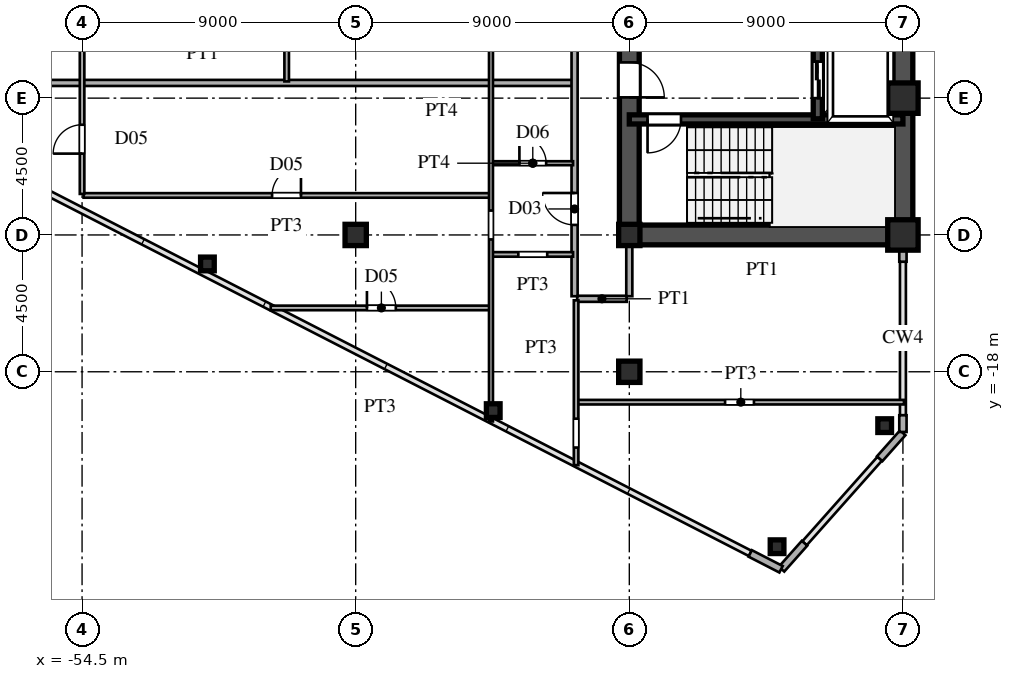
"""IFC4 building model, lengths in metres.
Left out: names, types, materials, properties, quantities, classifications, styles, units other than length and angle.
Written with IfcOpenShell. Run it as: python <this file> out.ifc"""

import sys

from ifc_helpers import new_model, si_unit, direction, frame, frame_2d, origin, origin_2d, place, context, subcontext, project, spatial, rectangle, hollow_rectangle, i_section, extrude, source, transform, mapped, element, fill, save


model = new_model("IFC4")
c1 = context("Model", 3, precision=1e-05, world=origin(), true_north=direction((0.0, 1.0)))
c2 = subcontext(c1, "Body", "Model", "MODEL_VIEW")
j1 = project(units=[si_unit("LENGTHUNIT", "METRE"), si_unit("PLANEANGLEUNIT", "RADIAN")], contexts=[c1])
p1 = place(None, origin())
s1 = spatial("IfcSite", under=j1, at=p1, CompositionType="ELEMENT")
p2 = place(p1, origin())
s2 = spatial("IfcBuilding", under=s1, at=p2, CompositionType="ELEMENT")
p3 = place(p2, frame((0.0, 0.0, 114.0)))
s3 = spatial("IfcBuildingStorey", under=s2, at=p3, CompositionType="ELEMENT", Elevation=114.0)
m1 = source(origin(), c2, "Body", "SweptSolid", [
    extrude(hollow_rectangle(XDim=1.0, YDim=1.0, WallThickness=0.042, at=origin_2d()), origin(), (0.0, 0.0, 1.0), 3.6),
])
for number, where, z_axis, x_axis in (
    (1, (-27.5, -13.5, 0.0), (0.0, 0.0, 1.0), (1.0, 0.0, 0.0)),
    (2, (-27.5, -9.0, 0.0), (0.0, 0.0, 1.0), (1.0, 0.0, 0.0)),
):
    element("IfcColumn", number, at=place(p3, frame(where, z_axis=z_axis, x_axis=x_axis)), inside=s3, PredefinedType="COLUMN", context=c2, shape_type="MappedRepresentation", body=[
        mapped(m1, transform((0.0, 0.0, 0.0), scale=1.0)),
    ])
m2 = source(origin(), c2, "Body", "SweptSolid", [
    extrude(i_section(OverallWidth=0.7, OverallDepth=0.7, WebThickness=0.028, FlangeThickness=0.045, at=origin_2d()), origin(), (0.0, 0.0, 1.0), 3.6),
])
for number, where, z_axis, x_axis in (
    (3, (-36.5, -18.0, 0.0), (0.0, 0.0, 1.0), (1.0, 0.0, 0.0)),
    (4, (-36.5, -13.5, 0.0), (0.0, 0.0, 1.0), (1.0, 0.0, 0.0)),
    (5, (-45.5, -13.5, 0.0), (0.0, 0.0, 1.0), (1.0, 0.0, 0.0)),
):
    element("IfcColumn", number, at=place(p3, frame(where, z_axis=z_axis, x_axis=x_axis)), inside=s3, PredefinedType="COLUMN", context=c2, shape_type="MappedRepresentation", body=[
        mapped(m2, transform((0.0, 0.0, 0.0), scale=1.0)),
    ])
m3 = source(origin(), c2, "Body", "SweptSolid", [
    extrude(hollow_rectangle(XDim=0.45, YDim=0.45, WallThickness=0.018, at=origin_2d()), origin(), (0.0, 0.0, 1.0), 3.6),
])
for number, where, z_axis, x_axis in (
    (6, (-28.1, -19.772, 0.0), (0.0, 0.0, 1.0), (1.0, 0.0, 0.0)),
    (7, (-31.64, -23.754, 0.0), (0.0, 0.0, 1.0), (1.0, 0.0, 0.0)),
    (8, (-40.976, -19.278, 0.0), (0.0, 0.0, 1.0), (1.0, 0.0, 0.0)),
    (9, (-50.377, -14.453, 0.0), (0.0, 0.0, 1.0), (1.0, 0.0, 0.0)),
):
    element("IfcColumn", number, at=place(p3, frame(where, z_axis=z_axis, x_axis=x_axis)), inside=s3, PredefinedType="COLUMN", context=c2, shape_type="MappedRepresentation", body=[
        mapped(m3, transform((0.0, 0.0, 0.0), scale=1.0)),
    ])
p4 = place(p3, frame((-27.5, -19.98, 0.0), z_axis=(0.0, 0.0, 1.0), x_axis=(0.0, 1.0, 0.0)))
e10 = element("IfcWall", 10, at=p4, inside=s3, PredefinedType="SOLIDWALL", context=c2, shape_type="SweptSolid", body=[
    extrude(rectangle(XDim=0.55, YDim=0.24, at=frame_2d((0.275, 0.0))), origin(), (0.0, 0.0, 1.0), 3.38),
])
p5 = place(p3, frame((-27.5, -14.38, 0.0), z_axis=(0.0, 0.0, 1.0), x_axis=(0.0, 1.0, 0.0)))
e11 = element("IfcWall", 11, at=p5, inside=s3, PredefinedType="SOLIDWALL", context=c2, shape_type="SweptSolid", body=[
    extrude(rectangle(XDim=0.55, YDim=0.24, at=frame_2d((0.275, 0.0))), origin(), (0.0, 0.0, 1.0), 2.88),
])
p6 = place(p3, frame((-32.523, -23.975, 0.0), z_axis=(0.0, 0.0, 1.0), x_axis=(0.889797395748, -0.456355776255, 0.0)))
e12 = element("IfcWall", 12, at=p6, inside=s3, PredefinedType="SOLIDWALL", context=c2, shape_type="SweptSolid", body=[
    extrude(rectangle(XDim=1.14, YDim=0.24, at=frame_2d((0.57, 0.0))), origin(), (0.0, 0.0, 1.0), 3.38),
])
for number, where, z_axis, x_axis in (
    (13, (-31.493, -24.492, 0.0), (0.0, 0.0, 1.0), (0.664, 0.747, 0.0)),
    (14, (-28.264, -20.86, 0.0), (0.0, 0.0, 1.0), (0.664, 0.747, 0.0)),
):
    element("IfcWall", number, at=place(p3, frame(where, z_axis=z_axis, x_axis=x_axis)), inside=s3, PredefinedType="SOLIDWALL", context=c2, shape_type="SweptSolid", body=[
        extrude(rectangle(XDim=1.14, YDim=0.24, at=frame_2d((0.57, 0.0))), origin(), (0.0, 0.0, 1.0), 3.38),
    ])
p7 = place(p3, frame((-27.5, -13.5, 0.0), z_axis=(0.0, 0.0, 1.0), x_axis=(0.0, 1.0, 0.0)))
e15 = element("IfcWall", 15, at=p7, inside=s3, PredefinedType="SHEAR", context=c2, shape_type="SweptSolid", body=[
    extrude(rectangle(XDim=12.2, YDim=0.65, at=frame_2d((6.1, 0.0))), origin(), (0.0, 0.0, 1.0), 3.38),
])
p8 = place(p3, frame((-36.5, -13.5, 0.0), z_axis=(0.0, 0.0, 1.0), x_axis=(1.0, 0.0, 0.0)))
e16 = element("IfcWall", 16, at=p8, inside=s3, PredefinedType="SHEAR", context=c2, shape_type="SweptSolid", body=[
    extrude(rectangle(XDim=9.0, YDim=0.65, at=frame_2d((4.5, 0.0))), origin(), (0.0, 0.0, 1.0), 3.38),
])
p9 = place(p3, frame((-36.5, -13.65, 0.0), z_axis=(0.0, 0.0, 1.0), x_axis=(0.0, 1.0, 0.0)))
e17 = element("IfcWall", 17, at=p9, inside=s3, PredefinedType="SHEAR", context=c2, shape_type="SweptSolid", body=[
    extrude(rectangle(XDim=7.15, YDim=0.65, at=frame_2d((3.575, 0.0))), origin(), (0.0, 0.0, 1.0), 3.38),
])
p10 = place(p9, frame((4.675, 0.0, 0.0)))
e18 = element("IfcOpeningElement", 18, at=p10, cuts=e17, PredefinedType="OPENING", context=c2, shape_type="SweptSolid", body=[
    extrude(rectangle(XDim=1.15, YDim=2.2, at=frame_2d((0.575, 1.1))), frame((0.0, 0.335, 0.0), z_axis=(0.0, -1.0, 0.0), x_axis=(1.0, 0.0, 0.0)), (0.0, 0.0, 1.0), 0.67),
])
p11 = place(p3, frame((-36.5, -9.7, 0.0), z_axis=(0.0, 0.0, 1.0), x_axis=(1.0, 0.0, 0.0)))
e19 = element("IfcWall", 19, at=p11, inside=s3, PredefinedType="SHEAR", context=c2, shape_type="SweptSolid", body=[
    extrude(rectangle(XDim=9.0, YDim=0.3, at=frame_2d((4.5, 0.0))), origin(), (0.0, 0.0, 1.0), 3.38),
])
p12 = place(p11, frame((0.6, 0.0, 0.0)))
e20 = element("IfcOpeningElement", 20, at=p12, cuts=e19, PredefinedType="OPENING", context=c2, shape_type="SweptSolid", body=[
    extrude(rectangle(XDim=1.1, YDim=2.2, at=frame_2d((0.55, 1.1))), frame((0.0, 0.16, 0.0), z_axis=(0.0, -1.0, 0.0), x_axis=(1.0, 0.0, 0.0)), (0.0, 0.0, 1.0), 0.32),
])
p13 = place(p3, frame((-30.3, -9.68, 0.0), z_axis=(0.0, 0.0, 1.0), x_axis=(0.0, 1.0, 0.0)))
e21 = element("IfcWall", 21, at=p13, inside=s3, PredefinedType="SHEAR", context=c2, shape_type="SweptSolid", body=[
    extrude(rectangle(XDim=2.56, YDim=0.3, at=frame_2d((1.28, 0.0))), origin(), (0.0, 0.0, 1.0), 3.38),
])
p14 = place(p13, frame((0.68, 0.0, 0.0)))
e22 = element("IfcOpeningElement", 22, at=p14, cuts=e21, PredefinedType="OPENING", context=c2, shape_type="SweptSolid", body=[
    extrude(rectangle(XDim=1.2, YDim=2.25, at=frame_2d((0.6, 1.125))), frame((0.0, 0.16, 0.0), z_axis=(0.0, -1.0, 0.0), x_axis=(1.0, 0.0, 0.0)), (0.0, 0.0, 1.0), 0.32),
])
p15 = place(p3, frame((-38.2, -19.0, 0.0), z_axis=(0.0, 0.0, 1.0), x_axis=(1.0, 0.0, 0.0)))
e23 = element("IfcWall", 23, at=p15, inside=s3, PredefinedType="PARTITIONING", context=c2, shape_type="SweptSolid", body=[
    extrude(rectangle(XDim=10.735, YDim=0.15, at=frame_2d((5.367, 0.0))), origin(), (0.0, 0.0, 1.0), 3.38),
])
p16 = place(p15, frame((4.85, 0.0, 0.0)))
e24 = element("IfcOpeningElement", 24, at=p16, cuts=e23, PredefinedType="OPENING", context=c2, shape_type="SweptSolid", body=[
    extrude(rectangle(XDim=0.95, YDim=2.15, at=frame_2d((0.475, 1.075))), frame((0.0, 0.085, 0.0), z_axis=(0.0, -1.0, 0.0), x_axis=(1.0, 0.0, 0.0)), (0.0, 0.0, 1.0), 0.17),
])
p17 = place(p3, frame((-48.295, -15.9, 0.0), z_axis=(0.0, 0.0, 1.0), x_axis=(1.0, 0.0, 0.0)))
e25 = element("IfcWall", 25, at=p17, inside=s3, PredefinedType="PARTITIONING", context=c2, shape_type="SweptSolid", body=[
    extrude(rectangle(XDim=7.195, YDim=0.15, at=frame_2d((3.597, 0.0))), origin(), (0.0, 0.0, 1.0), 3.38),
])
p18 = place(p17, frame((3.165, 0.0, 0.0)))
e26 = element("IfcOpeningElement", 26, at=p18, cuts=e25, PredefinedType="OPENING", context=c2, shape_type="SweptSolid", body=[
    extrude(rectangle(XDim=0.95, YDim=2.15, at=frame_2d((0.475, 1.075))), frame((0.0, 0.085, 0.0), z_axis=(0.0, -1.0, 0.0), x_axis=(1.0, 0.0, 0.0)), (0.0, 0.0, 1.0), 0.17),
])
p19 = place(p3, frame((-38.215, -15.6, 0.0), z_axis=(0.0, 0.0, 1.0), x_axis=(1.0, 0.0, 0.0)))
e27 = element("IfcWall", 27, at=p19, inside=s3, PredefinedType="PARTITIONING", context=c2, shape_type="SweptSolid", body=[
    extrude(rectangle(XDim=1.63, YDim=0.2, at=frame_2d((0.815, 0.0))), origin(), (0.0, 0.0, 1.0), 3.38),
])
p20 = place(p3, frame((-41.0, -14.14, 0.0), z_axis=(0.0, 0.0, 1.0), x_axis=(1.0, 0.0, 0.0)))
e28 = element("IfcWall", 28, at=p20, inside=s3, PredefinedType="PARTITIONING", context=c2, shape_type="SweptSolid", body=[
    extrude(rectangle(XDim=2.65, YDim=0.15, at=frame_2d((1.325, 0.0))), origin(), (0.0, 0.0, 1.0), 3.38),
])
p21 = place(p20, frame((0.85, 0.0, 0.0)))
e29 = element("IfcOpeningElement", 29, at=p21, cuts=e28, PredefinedType="OPENING", context=c2, shape_type="SweptSolid", body=[
    extrude(rectangle(XDim=0.95, YDim=2.15, at=frame_2d((0.475, 1.075))), frame((0.0, 0.085, 0.0), z_axis=(0.0, -1.0, 0.0), x_axis=(1.0, 0.0, 0.0)), (0.0, 0.0, 1.0), 0.17),
])
p22 = place(p3, frame((-54.45, -12.2, 0.0), z_axis=(0.0, 0.0, 1.0), x_axis=(1.0, 0.0, 0.0)))
e30 = element("IfcWall", 30, at=p22, inside=s3, PredefinedType="PARTITIONING", context=c2, shape_type="SweptSolid", body=[
    extrude(rectangle(XDim=13.35, YDim=0.15, at=frame_2d((6.675, 0.0))), origin(), (0.0, 0.0, 1.0), 3.38),
])
p23 = place(p22, frame((6.2, 0.0, 0.0)))
e31 = element("IfcOpeningElement", 31, at=p23, cuts=e30, PredefinedType="OPENING", context=c2, shape_type="SweptSolid", body=[
    extrude(rectangle(XDim=0.95, YDim=2.15, at=frame_2d((0.475, 1.075))), frame((0.0, 0.085, 0.0), z_axis=(0.0, -1.0, 0.0), x_axis=(1.0, 0.0, 0.0)), (0.0, 0.0, 1.0), 0.17),
])
p24 = place(p3, frame((-41.0, -11.14, 0.0), z_axis=(0.0, 0.0, 1.0), x_axis=(1.0, 0.0, 0.0)))
e32 = element("IfcWall", 32, at=p24, inside=s3, PredefinedType="PARTITIONING", context=c2, shape_type="SweptSolid", body=[
    extrude(rectangle(XDim=2.65, YDim=0.13, at=frame_2d((1.325, 0.0))), origin(), (0.0, 0.0, 1.0), 3.38),
])
p25 = place(p24, frame((0.885, 0.0, 0.0)))
e33 = element("IfcOpeningElement", 33, at=p25, cuts=e32, PredefinedType="OPENING", context=c2, shape_type="SweptSolid", body=[
    extrude(rectangle(XDim=0.88, YDim=2.1, at=frame_2d((0.44, 1.05))), frame((0.0, 0.075, 0.0), z_axis=(0.0, -1.0, 0.0), x_axis=(1.0, 0.0, 0.0)), (0.0, 0.0, 1.0), 0.15),
])
p26 = place(p3, frame((-62.69, -8.5, 0.0), z_axis=(0.0, 0.0, 1.0), x_axis=(1.0, 0.0, 0.0)))
e34 = element("IfcWall", 34, at=p26, inside=s3, PredefinedType="PARTITIONING", context=c2, shape_type="SweptSolid", body=[
    extrude(rectangle(XDim=24.31, YDim=0.2, at=frame_2d((12.155, 0.0))), origin(), (0.0, 0.0, 1.0), 3.38),
])
p27 = place(p3, frame((-54.5, -12.15, 0.0), z_axis=(0.0, 0.0, 1.0), x_axis=(0.0, 1.0, 0.0)))
e35 = element("IfcWall", 35, at=p27, inside=s3, PredefinedType="PARTITIONING", context=c2, shape_type="SweptSolid", body=[
    extrude(rectangle(XDim=22.3, YDim=0.15, at=frame_2d((11.15, 0.0))), origin(), (0.0, 0.0, 1.0), 2.78),
])
p28 = place(p27, frame((1.325, 0.0, 0.0)))
e36 = element("IfcOpeningElement", 36, at=p28, cuts=e35, PredefinedType="OPENING", context=c2, shape_type="SweptSolid", body=[
    extrude(rectangle(XDim=0.95, YDim=2.15, at=frame_2d((0.475, 1.075))), frame((0.0, 0.085, 0.0), z_axis=(0.0, -1.0, 0.0), x_axis=(1.0, 0.0, 0.0)), (0.0, 0.0, 1.0), 0.17),
])
p29 = place(p27, frame((10.175, 0.0, 0.0)))
e37 = element("IfcOpeningElement", 37, at=p29, cuts=e35, PredefinedType="OPENING", context=c2, shape_type="SweptSolid", body=[
    extrude(rectangle(XDim=0.95, YDim=2.15, at=frame_2d((0.475, 1.075))), frame((0.0, 0.085, 0.0), z_axis=(0.0, -1.0, 0.0), x_axis=(1.0, 0.0, 0.0)), (0.0, 0.0, 1.0), 0.17),
])
p30 = place(p27, frame((5.508, 0.0, 0.0)))
e38 = element("IfcOpeningElement", 38, at=p30, cuts=e35, PredefinedType="OPENING", context=c2, shape_type="SweptSolid", body=[
    extrude(rectangle(XDim=0.95, YDim=2.15, at=frame_2d((0.475, 1.075))), frame((0.0, 0.085, 0.0), z_axis=(0.0, -1.0, 0.0), x_axis=(1.0, 0.0, 0.0)), (0.0, 0.0, 1.0), 0.17),
])
p31 = place(p27, frame((14.842, 0.0, 0.0)))
e39 = element("IfcOpeningElement", 39, at=p31, cuts=e35, PredefinedType="OPENING", context=c2, shape_type="SweptSolid", body=[
    extrude(rectangle(XDim=0.95, YDim=2.15, at=frame_2d((0.475, 1.075))), frame((0.0, 0.085, 0.0), z_axis=(0.0, -1.0, 0.0), x_axis=(1.0, 0.0, 0.0)), (0.0, 0.0, 1.0), 0.17),
])
p32 = place(p27, frame((19.525, 0.0, 0.0)))
e40 = element("IfcOpeningElement", 40, at=p32, cuts=e35, PredefinedType="OPENING", context=c2, shape_type="SweptSolid", body=[
    extrude(rectangle(XDim=0.95, YDim=2.15, at=frame_2d((0.475, 1.075))), frame((0.0, 0.085, 0.0), z_axis=(0.0, -1.0, 0.0), x_axis=(1.0, 0.0, 0.0)), (0.0, 0.0, 1.0), 0.17),
])
p33 = place(p3, frame((-47.77, -8.45, 0.0), z_axis=(0.0, 0.0, 1.0), x_axis=(0.0, 1.0, 0.0)))
e41 = element("IfcWall", 41, at=p33, inside=s3, PredefinedType="PARTITIONING", context=c2, shape_type="SweptSolid", body=[
    extrude(rectangle(XDim=23.3, YDim=0.15, at=frame_2d((11.65, 0.0))), origin(), (0.0, 0.0, 1.0), 3.38),
])
p34 = place(p33, frame((6.475, 0.0, 0.0)))
e42 = element("IfcOpeningElement", 42, at=p34, cuts=e41, PredefinedType="OPENING", context=c2, shape_type="SweptSolid", body=[
    extrude(rectangle(XDim=0.95, YDim=2.15, at=frame_2d((0.475, 1.075))), frame((0.0, 0.085, 0.0), z_axis=(0.0, -1.0, 0.0), x_axis=(1.0, 0.0, 0.0)), (0.0, 0.0, 1.0), 0.17),
])
p35 = place(p33, frame((20.525, 0.0, 0.0)))
e43 = element("IfcOpeningElement", 43, at=p35, cuts=e41, PredefinedType="OPENING", context=c2, shape_type="SweptSolid", body=[
    extrude(rectangle(XDim=0.95, YDim=2.15, at=frame_2d((0.475, 1.075))), frame((0.0, 0.085, 0.0), z_axis=(0.0, -1.0, 0.0), x_axis=(1.0, 0.0, 0.0)), (0.0, 0.0, 1.0), 0.17),
])
p36 = place(p33, frame((15.825, 0.0, 0.0)))
e44 = element("IfcOpeningElement", 44, at=p36, cuts=e41, PredefinedType="OPENING", context=c2, shape_type="SweptSolid", body=[
    extrude(rectangle(XDim=0.95, YDim=2.15, at=frame_2d((0.475, 1.075))), frame((0.0, 0.085, 0.0), z_axis=(0.0, -1.0, 0.0), x_axis=(1.0, 0.0, 0.0)), (0.0, 0.0, 1.0), 0.17),
])
p37 = place(p3, frame((-41.05, -19.634, 0.0), z_axis=(0.0, 0.0, 1.0), x_axis=(0.0, 1.0, 0.0)))
e45 = element("IfcWall", 45, at=p37, inside=s3, PredefinedType="PARTITIONING", context=c2, shape_type="SweptSolid", body=[
    extrude(rectangle(XDim=20.417, YDim=0.13, at=frame_2d((10.208, 0.0))), origin(), (0.0, 0.0, 1.0), 2.99),
])
p38 = place(p37, frame((5.987, 0.0, 0.0)))
e46 = element("IfcOpeningElement", 46, at=p38, cuts=e45, PredefinedType="OPENING", context=c2, shape_type="SweptSolid", body=[
    extrude(rectangle(XDim=0.95, YDim=2.15, at=frame_2d((0.475, 1.075))), frame((0.0, 0.075, 0.0), z_axis=(0.0, -1.0, 0.0), x_axis=(1.0, 0.0, 0.0)), (0.0, 0.0, 1.0), 0.15),
])
p39 = place(p37, frame((17.659, 0.0, 0.0)))
e47 = element("IfcOpeningElement", 47, at=p39, cuts=e45, PredefinedType="OPENING", context=c2, shape_type="SweptSolid", body=[
    extrude(rectangle(XDim=0.95, YDim=2.15, at=frame_2d((0.475, 1.075))), frame((0.0, 0.075, 0.0), z_axis=(0.0, -1.0, 0.0), x_axis=(1.0, 0.0, 0.0)), (0.0, 0.0, 1.0), 0.15),
])
p40 = place(p3, frame((-38.3, -15.515, 0.0), z_axis=(0.0, 0.0, 1.0), x_axis=(0.0, 1.0, 0.0)))
e48 = element("IfcWall", 48, at=p40, inside=s3, PredefinedType="PARTITIONING", context=c2, shape_type="SweptSolid", body=[
    extrude(rectangle(XDim=31.03, YDim=0.2, at=frame_2d((15.515, 0.0))), origin(), (0.0, 0.0, 1.0), 3.38),
])
p41 = place(p40, frame((2.345, 0.0, 0.0)))
e49 = element("IfcOpeningElement", 49, at=p41, cuts=e48, PredefinedType="OPENING", context=c2, shape_type="SweptSolid", body=[
    extrude(rectangle(XDim=1.05, YDim=2.25, at=frame_2d((0.525, 1.125))), frame((0.0, 0.11, 0.0), z_axis=(0.0, -1.0, 0.0), x_axis=(1.0, 0.0, 0.0)), (0.0, 0.0, 1.0), 0.22),
])
p42 = place(p40, frame((13.28, 0.0, 0.0)))
e50 = element("IfcOpeningElement", 50, at=p42, cuts=e48, PredefinedType="OPENING", context=c2, shape_type="SweptSolid", body=[
    extrude(rectangle(XDim=1.05, YDim=2.25, at=frame_2d((0.525, 1.125))), frame((0.0, 0.11, 0.0), z_axis=(0.0, -1.0, 0.0), x_axis=(1.0, 0.0, 0.0)), (0.0, 0.0, 1.0), 0.22),
])
p43 = place(p40, frame((25.567, 0.0, 0.0)))
e51 = element("IfcOpeningElement", 51, at=p43, cuts=e48, PredefinedType="OPENING", context=c2, shape_type="SweptSolid", body=[
    extrude(rectangle(XDim=1.05, YDim=2.25, at=frame_2d((0.525, 1.125))), frame((0.0, 0.11, 0.0), z_axis=(0.0, -1.0, 0.0), x_axis=(1.0, 0.0, 0.0)), (0.0, 0.0, 1.0), 0.22),
])
p44 = place(p3, frame((-38.25, -21.071, 0.0), z_axis=(0.0, 0.0, 1.0), x_axis=(0.0, 1.0, 0.0)))
e52 = element("IfcWall", 52, at=p44, inside=s3, PredefinedType="PARTITIONING", context=c2, shape_type="SweptSolid", body=[
    extrude(rectangle(XDim=5.421, YDim=0.15, at=frame_2d((2.71, 0.0))), origin(), (0.0, 0.0, 1.0), 3.38),
])
p45 = place(p44, frame((0.578, 0.0, 0.0)))
e53 = element("IfcOpeningElement", 53, at=p45, cuts=e52, PredefinedType="OPENING", context=c2, shape_type="SweptSolid", body=[
    extrude(rectangle(XDim=0.95, YDim=2.15, at=frame_2d((0.475, 1.075))), frame((0.0, 0.085, 0.0), z_axis=(0.0, -1.0, 0.0), x_axis=(1.0, 0.0, 0.0)), (0.0, 0.0, 1.0), 0.17),
])
p46 = place(p3, frame((-36.5, -15.515, 0.0), z_axis=(0.0, 0.0, 1.0), x_axis=(0.0, 1.0, 0.0)))
e54 = element("IfcWall", 54, at=p46, inside=s3, PredefinedType="PARTITIONING", context=c2, shape_type="SweptSolid", body=[
    extrude(rectangle(XDim=1.685, YDim=0.2, at=frame_2d((0.842, 0.0))), origin(), (0.0, 0.0, 1.0), 2.78),
])
m4 = source(origin(), c2, "Body", "SweptSolid", [
    extrude(rectangle(XDim=1.15, YDim=2.2, at=frame_2d((0.575, 1.1))), frame((0.0, 0.025, 0.0), z_axis=(0.0, -1.0, 0.0), x_axis=(1.0, 0.0, 0.0)), (0.0, 0.0, 1.0), 0.05),
])
p47 = place(p10, frame((1.15, 0.0, 0.0), z_axis=(0.0, 0.0, 1.0), x_axis=(-1.0, 0.0, 0.0)))
e55 = element("IfcDoor", 55, at=p47, inside=s3, OperationType="SINGLE_SWING_LEFT", PredefinedType="DOOR", context=c2, shape_type="MappedRepresentation", body=[
    mapped(m4, transform((0.0, 0.0, 0.0), scale=1.0)),
])
fill(e18, e55)
m5 = source(origin(), c2, "Body", "SweptSolid", [
    extrude(rectangle(XDim=1.1, YDim=2.2, at=frame_2d((0.55, 1.1))), frame((0.0, 0.025, 0.0), z_axis=(0.0, -1.0, 0.0), x_axis=(1.0, 0.0, 0.0)), (0.0, 0.0, 1.0), 0.05),
])
p48 = place(p12, frame((1.1, 0.0, 0.0), z_axis=(0.0, 0.0, 1.0), x_axis=(-1.0, 0.0, 0.0)))
e56 = element("IfcDoor", 56, at=p48, inside=s3, OperationType="SINGLE_SWING_LEFT", PredefinedType="DOOR", context=c2, shape_type="MappedRepresentation", body=[
    mapped(m5, transform((0.0, 0.0, 0.0), scale=1.0)),
])
fill(e20, e56)
m6 = source(origin(), c2, "Body", "SweptSolid", [
    extrude(rectangle(XDim=1.2, YDim=2.25, at=frame_2d((0.6, 1.125))), frame((0.0, 0.025, 0.0), z_axis=(0.0, -1.0, 0.0), x_axis=(1.0, 0.0, 0.0)), (0.0, 0.0, 1.0), 0.05),
])
p49 = place(p14, origin())
e57 = element("IfcDoor", 57, at=p49, inside=s3, OperationType="DOUBLE_DOOR_SLIDING", PredefinedType="DOOR", context=c2, shape_type="MappedRepresentation", body=[
    mapped(m6, transform((0.0, 0.0, 0.0), scale=1.0)),
])
fill(e22, e57)
m7 = source(origin(), c2, "Body", "SweptSolid", [
    extrude(rectangle(XDim=0.95, YDim=2.15, at=frame_2d((0.475, 1.075))), frame((0.0, 0.025, 0.0), z_axis=(0.0, -1.0, 0.0), x_axis=(1.0, 0.0, 0.0)), (0.0, 0.0, 1.0), 0.05),
])
p50 = place(p18, origin())
e58 = element("IfcDoor", 58, at=p50, inside=s3, OperationType="SINGLE_SWING_LEFT", PredefinedType="DOOR", context=c2, shape_type="MappedRepresentation", body=[
    mapped(m7, transform((0.0, 0.0, 0.0), scale=1.0)),
])
fill(e26, e58)
p51 = place(p23, origin())
e59 = element("IfcDoor", 59, at=p51, inside=s3, OperationType="SINGLE_SWING_RIGHT", PredefinedType="DOOR", context=c2, shape_type="MappedRepresentation", body=[
    mapped(m7, transform((0.0, 0.0, 0.0), scale=1.0)),
])
fill(e31, e59)
m8 = source(origin(), c2, "Body", "SweptSolid", [
    extrude(rectangle(XDim=0.88, YDim=2.1, at=frame_2d((0.44, 1.05))), frame((0.0, 0.025, 0.0), z_axis=(0.0, -1.0, 0.0), x_axis=(1.0, 0.0, 0.0)), (0.0, 0.0, 1.0), 0.05),
])
p52 = place(p25, origin())
e60 = element("IfcDoor", 60, at=p52, inside=s3, OperationType="SINGLE_SWING_LEFT", PredefinedType="DOOR", context=c2, shape_type="MappedRepresentation", body=[
    mapped(m8, transform((0.0, 0.0, 0.0), scale=1.0)),
])
fill(e33, e60)
p53 = place(p28, origin())
e61 = element("IfcDoor", 61, at=p53, inside=s3, OperationType="SINGLE_SWING_LEFT", PredefinedType="DOOR", context=c2, shape_type="MappedRepresentation", body=[
    mapped(m7, transform((0.0, 0.0, 0.0), scale=1.0)),
])
fill(e36, e61)
m9 = source(origin(), c2, "Body", "SweptSolid", [
    extrude(rectangle(XDim=1.05, YDim=2.25, at=frame_2d((0.525, 1.125))), frame((0.0, 0.025, 0.0), z_axis=(0.0, -1.0, 0.0), x_axis=(1.0, 0.0, 0.0)), (0.0, 0.0, 1.0), 0.05),
])
p54 = place(p41, origin())
e62 = element("IfcDoor", 62, at=p54, inside=s3, OperationType="SINGLE_SWING_RIGHT", PredefinedType="DOOR", context=c2, shape_type="MappedRepresentation", body=[
    mapped(m9, transform((0.0, 0.0, 0.0), scale=1.0)),
])
fill(e49, e62)
save(model, sys.argv[1])
